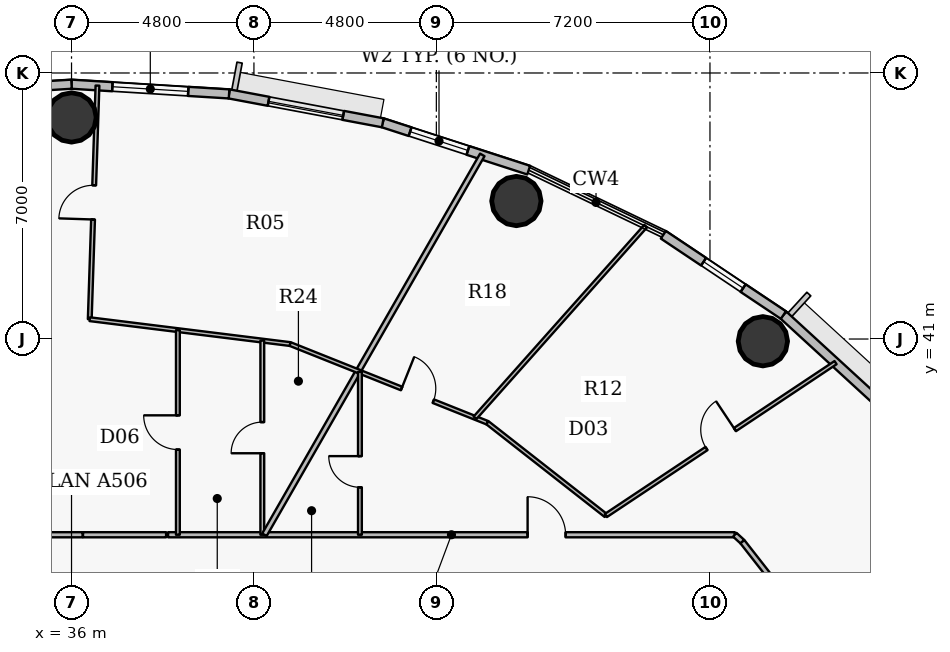
"""IFC4 building model, lengths in metres.
Left out: names, types, materials, properties, quantities, classifications, styles, units other than length and angle.
Written with IfcOpenShell. Run it as: python <this file> out.ifc"""

import sys

from ifc_helpers import new_model, si_unit, direction, frame, frame_2d, origin, origin_2d, place, context, subcontext, project, spatial, rectangle, hollow_circle, extrude, source, transform, mapped, element, fill, save


model = new_model("IFC4")
c1 = context("Model", 3, precision=1e-05, world=origin(), true_north=direction((0.0, 1.0)))
c2 = subcontext(c1, "Body", "Model", "MODEL_VIEW")
j1 = project(units=[si_unit("LENGTHUNIT", "METRE"), si_unit("PLANEANGLEUNIT", "RADIAN")], contexts=[c1])
p1 = place(None, origin())
s1 = spatial("IfcSite", under=j1, at=p1, CompositionType="ELEMENT")
p2 = place(p1, origin())
s2 = spatial("IfcBuilding", under=s1, at=p2, CompositionType="ELEMENT")
p3 = place(p2, frame((0.0, 0.0, 197.4)))
s3 = spatial("IfcBuildingStorey", under=s2, at=p3, CompositionType="ELEMENT", Elevation=197.4)
for number, where, z_axis, x_axis in (
    (1, (54.192, 40.942, 0.0), (0.0, 0.0, 1.0), (1.0, 0.0, 0.0)),
    (2, (47.706, 44.631, 0.0), (0.0, 0.0, 1.0), (1.0, 0.0, 0.0)),
    (3, (36.0, 46.83, 0.0), (0.0, 0.0, 1.0), (1.0, 0.0, 0.0)),
):
    element("IfcColumn", number, at=place(p3, frame(where, z_axis=z_axis, x_axis=x_axis)), inside=s3, PredefinedType="COLUMN", context=c2, shape_type="SweptSolid", body=[
        extrude(hollow_circle(Radius=0.65, WallThickness=0.04, at=origin_2d()), origin(), (0.0, 0.0, 1.0), 3.75),
    ])
p4 = place(p3, frame((54.732, 41.631, 0.0), z_axis=(0.0, 0.0, 1.0), x_axis=(0.737076565834, -0.675809245349, 0.0)))
e4 = element("IfcWall", 4, at=p4, inside=s3, PredefinedType="SOLIDWALL", context=c2, shape_type="SweptSolid", body=[
    extrude(rectangle(XDim=3.658, YDim=0.24, at=frame_2d((1.829, 0.0))), origin(), (0.0, 0.0, 1.0), 3.5),
])
p5 = place(p3, frame((51.573, 43.743, 0.0), z_axis=(0.0, 0.0, 1.0), x_axis=(0.831228998277, -0.555930168657, 0.0)))
e5 = element("IfcWall", 5, at=p5, inside=s3, PredefinedType="SOLIDWALL", context=c2, shape_type="SweptSolid", body=[
    extrude(rectangle(XDim=3.8, YDim=0.24, at=frame_2d((1.9, 0.0))), origin(), (0.0, 0.0, 1.0), 3.5),
])
p6 = place(p5, frame((1.275, 0.0, 0.9)))
e6 = element("IfcOpeningElement", 6, at=p6, cuts=e5, PredefinedType="OPENING", context=c2, shape_type="SweptSolid", body=[
    extrude(rectangle(XDim=1.25, YDim=1.65, at=origin_2d()), frame((0.625, 0.13, 0.825), z_axis=(0.0, -1.0, 0.0), x_axis=(1.0, 0.0, 0.0)), (0.0, 0.0, 1.0), 0.26),
])
p7 = place(p3, frame((44.189, 46.689, 0.0), z_axis=(0.0, 0.0, 1.0), x_axis=(0.951209870236, -0.30854462038, 0.0)))
e7 = element("IfcWall", 7, at=p7, inside=s3, PredefinedType="SOLIDWALL", context=c2, shape_type="SweptSolid", body=[
    extrude(rectangle(XDim=4.038, YDim=0.24, at=frame_2d((2.019, 0.0))), origin(), (0.0, 0.0, 1.0), 3.5),
])
p8 = place(p7, frame((0.757, 0.0, 0.9)))
e8 = element("IfcOpeningElement", 8, at=p8, cuts=e7, PredefinedType="OPENING", context=c2, shape_type="SweptSolid", body=[
    extrude(rectangle(XDim=1.6, YDim=1.75, at=origin_2d()), frame((0.8, 0.13, 0.875), z_axis=(0.0, -1.0, 0.0), x_axis=(1.0, 0.0, 0.0)), (0.0, 0.0, 1.0), 0.26),
])
p9 = place(p3, frame((40.146, 47.449, 0.0), z_axis=(0.0, 0.0, 1.0), x_axis=(0.982788108205, -0.184736391573, 0.0)))
e9 = element("IfcWall", 9, at=p9, inside=s3, PredefinedType="SOLIDWALL", context=c2, shape_type="SweptSolid", body=[
    extrude(rectangle(XDim=4.114, YDim=0.24, at=frame_2d((2.057, 0.0))), origin(), (0.0, 0.0, 1.0), 3.5),
])
p10 = place(p9, frame((1.057, 0.0, 0.9)))
e10 = element("IfcOpeningElement", 10, at=p10, cuts=e9, PredefinedType="OPENING", context=c2, shape_type="SweptSolid", body=[
    extrude(rectangle(XDim=2.0, YDim=1.75, at=origin_2d()), frame((1.0, 0.13, 0.875), z_axis=(0.0, -1.0, 0.0), x_axis=(1.0, 0.0, 0.0)), (0.0, 0.0, 1.0), 0.26),
])
p11 = place(p3, frame((36.0, 47.705, 0.0), z_axis=(0.0, 0.0, 1.0), x_axis=(0.998104600619, -0.061540281305, 0.0)))
e11 = element("IfcWall", 11, at=p11, inside=s3, PredefinedType="SOLIDWALL", context=c2, shape_type="SweptSolid", body=[
    extrude(rectangle(XDim=4.154, YDim=0.24, at=frame_2d((2.077, 0.0))), origin(), (0.0, 0.0, 1.0), 3.5),
])
p12 = place(p11, frame((1.077, 0.0, 0.9)))
e12 = element("IfcOpeningElement", 12, at=p12, cuts=e11, PredefinedType="OPENING", context=c2, shape_type="SweptSolid", body=[
    extrude(rectangle(XDim=2.0, YDim=1.75, at=origin_2d()), frame((1.0, 0.13, 0.875), z_axis=(0.0, -1.0, 0.0), x_axis=(1.0, 0.0, 0.0)), (0.0, 0.0, 1.0), 0.26),
])
p13 = place(p3, frame((31.854, 47.449, 0.0), z_axis=(0.0, 0.0, 1.0), x_axis=(0.998104600619, 0.061540281305, 0.0)))
e13 = element("IfcWall", 13, at=p13, inside=s3, PredefinedType="SOLIDWALL", context=c2, shape_type="SweptSolid", body=[
    extrude(rectangle(XDim=4.154, YDim=0.24, at=frame_2d((2.077, 0.0))), origin(), (0.0, 0.0, 1.0), 3.5),
])
p14 = place(p13, frame((1.077, 0.0, 0.9)))
e14 = element("IfcOpeningElement", 14, at=p14, cuts=e13, PredefinedType="OPENING", context=c2, shape_type="SweptSolid", body=[
    extrude(rectangle(XDim=2.0, YDim=1.75, at=origin_2d()), frame((1.0, 0.13, 0.875), z_axis=(0.0, -1.0, 0.0), x_axis=(1.0, 0.0, 0.0)), (0.0, 0.0, 1.0), 0.26),
])
p15 = place(p3, frame((24.35, 35.85, 0.0), z_axis=(0.0, 0.0, 1.0), x_axis=(1.0, 0.0, 0.0)))
e15 = element("IfcWall", 15, at=p15, inside=s3, PredefinedType="PARTITIONING", context=c2, shape_type="SweptSolid", body=[
    extrude(rectangle(XDim=11.942, YDim=0.135, at=frame_2d((5.971, 0.0))), origin(), (0.0, 0.0, 1.0), 2.935),
])
p16 = place(p15, frame((5.471, 0.0, 0.0)))
e16 = element("IfcOpeningElement", 16, at=p16, cuts=e15, PredefinedType="OPENING", context=c2, shape_type="SweptSolid", body=[
    extrude(rectangle(XDim=1.0, YDim=2.15, at=origin_2d()), frame((0.5, 0.078, 1.075), z_axis=(0.0, -1.0, 0.0), x_axis=(1.0, 0.0, 0.0)), (0.0, 0.0, 1.0), 0.155),
])
p17 = place(p3, frame((36.48, 41.521, 0.0), z_axis=(0.0, 0.0, 1.0), x_axis=(0.033029315495, 0.99945438331, 0.0)))
e17 = element("IfcWall", 17, at=p17, inside=s3, PredefinedType="PARTITIONING", context=c2, shape_type="SweptSolid", body=[
    extrude(rectangle(XDim=6.15, YDim=0.1, at=frame_2d((3.075, 0.0))), origin(), (0.0, 0.0, 1.0), 2.935),
])
p18 = place(p17, frame((2.625, 0.0, 0.0)))
e18 = element("IfcOpeningElement", 18, at=p18, cuts=e17, PredefinedType="OPENING", context=c2, shape_type="SweptSolid", body=[
    extrude(rectangle(XDim=0.9, YDim=2.1, at=origin_2d()), frame((0.45, 0.06, 1.05), z_axis=(0.0, -1.0, 0.0), x_axis=(1.0, 0.0, 0.0)), (0.0, 0.0, 1.0), 0.12),
])
p19 = place(p3, frame((36.48, 41.521, 0.0), z_axis=(0.0, 0.0, 1.0), x_axis=(0.992397562131, -0.123073468612, 0.0)))
e19 = element("IfcWall", 19, at=p19, inside=s3, PredefinedType="PARTITIONING", context=c2, shape_type="SweptSolid", body=[
    extrude(rectangle(XDim=5.314, YDim=0.1, at=frame_2d((2.657, 0.0))), origin(), (0.0, 0.0, 1.0), 3.5),
])
p20 = place(p3, frame((38.541, 35.85, 0.0), z_axis=(0.0, 0.0, 1.0), x_axis=(1.0, 0.0, 0.0)))
e20 = element("IfcWall", 20, at=p20, inside=s3, PredefinedType="PARTITIONING", context=c2, shape_type="SweptSolid", body=[
    extrude(rectangle(XDim=14.913, YDim=0.135, at=frame_2d((7.456, 0.0))), origin(), (0.0, 0.0, 1.0), 2.935),
])
p21 = place(p20, frame((9.46, 0.0, 0.0)))
e21 = element("IfcOpeningElement", 21, at=p21, cuts=e20, PredefinedType="OPENING", context=c2, shape_type="SweptSolid", body=[
    extrude(rectangle(XDim=1.0, YDim=2.15, at=origin_2d()), frame((0.5, 0.078, 1.075), z_axis=(0.0, -1.0, 0.0), x_axis=(1.0, 0.0, 0.0)), (0.0, 0.0, 1.0), 0.155),
])
p22 = place(p3, frame((38.799, 35.85, 0.0), z_axis=(0.0, 0.0, 1.0), x_axis=(0.0, 1.0, 0.0)))
e22 = element("IfcWall", 22, at=p22, inside=s3, PredefinedType="PARTITIONING", context=c2, shape_type="SweptSolid", body=[
    extrude(rectangle(XDim=5.384, YDim=0.1, at=frame_2d((2.692, 0.0))), origin(), (0.0, 0.0, 1.0), 3.5),
])
p23 = place(p22, frame((2.242, 0.0, 0.0)))
e23 = element("IfcOpeningElement", 23, at=p23, cuts=e22, PredefinedType="OPENING", context=c2, shape_type="SweptSolid", body=[
    extrude(rectangle(XDim=0.9, YDim=2.1, at=origin_2d()), frame((0.45, 0.06, 1.05), z_axis=(0.0, -1.0, 0.0), x_axis=(1.0, 0.0, 0.0)), (0.0, 0.0, 1.0), 0.12),
])
p24 = place(p3, frame((41.02, 35.85, 0.0), z_axis=(0.0, 0.0, 1.0), x_axis=(0.0, 1.0, 0.0)))
e24 = element("IfcWall", 24, at=p24, inside=s3, PredefinedType="PARTITIONING", context=c2, shape_type="SweptSolid", body=[
    extrude(rectangle(XDim=5.108, YDim=0.1, at=frame_2d((2.554, 0.0))), origin(), (0.0, 0.0, 1.0), 3.5),
])
p25 = place(p24, frame((2.144, 0.0, 0.0)))
e25 = element("IfcOpeningElement", 25, at=p25, cuts=e24, PredefinedType="OPENING", context=c2, shape_type="SweptSolid", body=[
    extrude(rectangle(XDim=0.82, YDim=2.1, at=origin_2d()), frame((0.41, 0.06, 1.05), z_axis=(0.0, -1.0, 0.0), x_axis=(1.0, 0.0, 0.0)), (0.0, 0.0, 1.0), 0.12),
])
p26 = place(p3, frame((41.076, 35.85, 0.0), z_axis=(0.0, 0.0, 1.0), x_axis=(0.497557605347, 0.867430936364, 0.0)))
e26 = element("IfcWall", 26, at=p26, inside=s3, PredefinedType="PARTITIONING", context=c2, shape_type="SweptSolid", body=[
    extrude(rectangle(XDim=11.522, YDim=0.135, at=frame_2d((5.761, 0.0))), origin(), (0.0, 0.0, 1.0), 2.935),
])
p27 = place(p3, frame((41.754, 40.867, 0.0), z_axis=(0.0, 0.0, 1.0), x_axis=(0.928792710591, -0.370599650233, 0.0)))
e27 = element("IfcWall", 27, at=p27, inside=s3, PredefinedType="PARTITIONING", context=c2, shape_type="SweptSolid", body=[
    extrude(rectangle(XDim=5.588, YDim=0.1, at=frame_2d((2.794, 0.0))), origin(), (0.0, 0.0, 1.0), 2.935),
])
p28 = place(p27, frame((3.156, 0.0, 0.0)))
e28 = element("IfcOpeningElement", 28, at=p28, cuts=e27, PredefinedType="OPENING", context=c2, shape_type="SweptSolid", body=[
    extrude(rectangle(XDim=0.9, YDim=2.1, at=origin_2d()), frame((0.45, 0.06, 1.05), z_axis=(0.0, -1.0, 0.0), x_axis=(1.0, 0.0, 0.0)), (0.0, 0.0, 1.0), 0.12),
])
p29 = place(p3, frame((43.589, 35.85, 0.0), z_axis=(0.0, 0.0, 1.0), x_axis=(0.0, 1.0, 0.0)))
e29 = element("IfcWall", 29, at=p29, inside=s3, PredefinedType="PARTITIONING", context=c2, shape_type="SweptSolid", body=[
    extrude(rectangle(XDim=4.285, YDim=0.1, at=frame_2d((2.143, 0.0))), origin(), (0.0, 0.0, 1.0), 2.935),
])
p30 = place(p29, frame((1.249, 0.0, 0.0)))
e30 = element("IfcOpeningElement", 30, at=p30, cuts=e29, PredefinedType="OPENING", context=c2, shape_type="SweptSolid", body=[
    extrude(rectangle(XDim=0.82, YDim=2.1, at=origin_2d()), frame((0.41, 0.06, 1.05), z_axis=(0.0, -1.0, 0.0), x_axis=(1.0, 0.0, 0.0)), (0.0, 0.0, 1.0), 0.12),
])
p31 = place(p3, frame((46.617, 38.927, 0.0), z_axis=(0.0, 0.0, 1.0), x_axis=(0.664908846083, 0.746924511849, 0.0)))
e31 = element("IfcWall", 31, at=p31, inside=s3, PredefinedType="PARTITIONING", context=c2, shape_type="SweptSolid", body=[
    extrude(rectangle(XDim=6.754, YDim=0.1, at=frame_2d((3.377, 0.0))), origin(), (0.0, 0.0, 1.0), 2.935),
])
p32 = place(p3, frame((46.945, 38.796, 0.0), z_axis=(0.0, 0.0, 1.0), x_axis=(0.787314896848, -0.616551095369, 0.0)))
e32 = element("IfcWall", 32, at=p32, inside=s3, PredefinedType="PARTITIONING", context=c2, shape_type="SweptSolid", body=[
    extrude(rectangle(XDim=3.958, YDim=0.1, at=frame_2d((1.979, 0.0))), origin(), (0.0, 0.0, 1.0), 2.935),
])
p33 = place(p3, frame((50.06, 36.356, 0.0), z_axis=(0.0, 0.0, 1.0), x_axis=(0.832520763353, 0.553993843455, 0.0)))
e33 = element("IfcWall", 33, at=p33, inside=s3, PredefinedType="PARTITIONING", context=c2, shape_type="SweptSolid", body=[
    extrude(rectangle(XDim=7.26, YDim=0.1, at=frame_2d((3.63, 0.0))), origin(), (0.0, 0.0, 1.0), 2.935),
])
p34 = place(p33, frame((3.18, 0.0, 0.0)))
e34 = element("IfcOpeningElement", 34, at=p34, cuts=e33, PredefinedType="OPENING", context=c2, shape_type="SweptSolid", body=[
    extrude(rectangle(XDim=0.9, YDim=2.1, at=origin_2d()), frame((0.45, 0.06, 1.05), z_axis=(0.0, -1.0, 0.0), x_axis=(1.0, 0.0, 0.0)), (0.0, 0.0, 1.0), 0.12),
])
p35 = place(p3, frame((53.454, 35.85, 0.0), z_axis=(0.0, 0.0, 1.0), x_axis=(0.736667385572, -0.676255249913, 0.0)))
e35 = element("IfcWall", 35, at=p35, inside=s3, PredefinedType="PARTITIONING", context=c2, shape_type="SweptSolid", body=[
    extrude(rectangle(XDim=0.271, YDim=0.135, at=frame_2d((0.135, 0.0))), origin(), (0.0, 0.0, 1.0), 3.5),
])
p36 = place(p3, frame((53.653, 35.667, 0.0), z_axis=(0.0, 0.0, 1.0), x_axis=(0.616302223209, -0.787509726713, 0.0)))
e36 = element("IfcWall", 36, at=p36, inside=s3, PredefinedType="PARTITIONING", context=c2, shape_type="SweptSolid", body=[
    extrude(rectangle(XDim=2.18, YDim=0.135, at=frame_2d((1.09, 0.0))), origin(), (0.0, 0.0, 1.0), 3.5),
])
p37 = place(p3, frame((36.302, 35.85, 0.0), z_axis=(0.0, 0.0, 1.0), x_axis=(1.0, 0.0, 0.0)))
e37 = element("IfcWall", 37, at=p37, inside=s3, PredefinedType="PARTITIONING", context=c2, shape_type="SweptSolid", body=[
    extrude(rectangle(XDim=2.187, YDim=0.135, at=frame_2d((1.093, 0.0))), origin(), (0.0, 0.0, 1.0), 3.5),
])
m1 = source(origin(), c2, "Body", "SweptSolid", [
    extrude(rectangle(XDim=1.6, YDim=1.75, at=origin_2d()), frame((0.8, 0.03, 0.875), z_axis=(0.0, -1.0, 0.0), x_axis=(1.0, 0.0, 0.0)), (0.0, 0.0, 1.0), 0.06),
])
p38 = place(p8, origin())
e38 = element("IfcWindow", 38, at=p38, inside=s3, PartitioningType="DOUBLE_PANEL_VERTICAL", PredefinedType="WINDOW", context=c2, shape_type="MappedRepresentation", body=[
    mapped(m1, transform((0.0, 0.0, 0.0), x_axis=(1.0, 0.0, 0.0), y_axis=(0.0, 1.0, 0.0), z_axis=(0.0, 0.0, 1.0), scale=1.0)),
])
fill(e8, e38)
m2 = source(origin(), c2, "Body", "SweptSolid", [
    extrude(rectangle(XDim=2.0, YDim=1.75, at=origin_2d()), frame((1.0, 0.03, 0.875), z_axis=(0.0, -1.0, 0.0), x_axis=(1.0, 0.0, 0.0)), (0.0, 0.0, 1.0), 0.06),
])
p39 = place(p10, origin())
e39 = element("IfcWindow", 39, at=p39, inside=s3, PartitioningType="DOUBLE_PANEL_VERTICAL", PredefinedType="WINDOW", context=c2, shape_type="MappedRepresentation", body=[
    mapped(m2, transform((0.0, 0.0, 0.0), x_axis=(1.0, 0.0, 0.0), y_axis=(0.0, 1.0, 0.0), z_axis=(0.0, 0.0, 1.0), scale=1.0)),
])
fill(e10, e39)
p40 = place(p12, origin())
e40 = element("IfcWindow", 40, at=p40, inside=s3, PartitioningType="DOUBLE_PANEL_VERTICAL", PredefinedType="WINDOW", context=c2, shape_type="MappedRepresentation", body=[
    mapped(m2, transform((0.0, 0.0, 0.0), x_axis=(1.0, 0.0, 0.0), y_axis=(0.0, 1.0, 0.0), z_axis=(0.0, 0.0, 1.0), scale=1.0)),
])
fill(e12, e40)
m3 = source(origin(), c2, "Body", "SweptSolid", [
    extrude(rectangle(XDim=1.25, YDim=1.65, at=origin_2d()), frame((0.625, 0.03, 0.825), z_axis=(0.0, -1.0, 0.0), x_axis=(1.0, 0.0, 0.0)), (0.0, 0.0, 1.0), 0.06),
])
p41 = place(p6, origin())
e41 = element("IfcWindow", 41, at=p41, inside=s3, PartitioningType="SINGLE_PANEL", PredefinedType="WINDOW", context=c2, shape_type="MappedRepresentation", body=[
    mapped(m3, transform((0.0, 0.0, 0.0), x_axis=(1.0, 0.0, 0.0), y_axis=(0.0, 1.0, 0.0), z_axis=(0.0, 0.0, 1.0), scale=1.0)),
])
fill(e6, e41)
m4 = source(origin(), c2, "Body", "SweptSolid", [
    extrude(rectangle(XDim=1.0, YDim=2.15, at=origin_2d()), frame((0.5, 0.025, 1.075), z_axis=(0.0, -1.0, 0.0), x_axis=(1.0, 0.0, 0.0)), (0.0, 0.0, 1.0), 0.05),
])
p42 = place(p21, origin())
e42 = element("IfcDoor", 42, at=p42, inside=s3, OperationType="SINGLE_SWING_LEFT", PredefinedType="DOOR", context=c2, shape_type="MappedRepresentation", body=[
    mapped(m4, transform((0.0, 0.0, 0.0), x_axis=(1.0, 0.0, 0.0), y_axis=(0.0, 1.0, 0.0), z_axis=(0.0, 0.0, 1.0), scale=1.0)),
])
fill(e21, e42)
m5 = source(origin(), c2, "Body", "SweptSolid", [
    extrude(rectangle(XDim=0.9, YDim=2.1, at=origin_2d()), frame((0.45, 0.025, 1.05), z_axis=(0.0, -1.0, 0.0), x_axis=(1.0, 0.0, 0.0)), (0.0, 0.0, 1.0), 0.05),
])
p43 = place(p34, origin())
e43 = element("IfcDoor", 43, at=p43, inside=s3, OperationType="SINGLE_SWING_RIGHT", PredefinedType="DOOR", context=c2, shape_type="MappedRepresentation", body=[
    mapped(m5, transform((0.0, 0.0, 0.0), x_axis=(1.0, 0.0, 0.0), y_axis=(0.0, 1.0, 0.0), z_axis=(0.0, 0.0, 1.0), scale=1.0)),
])
fill(e34, e43)
p44 = place(p28, origin())
e44 = element("IfcDoor", 44, at=p44, inside=s3, OperationType="SINGLE_SWING_LEFT", PredefinedType="DOOR", context=c2, shape_type="MappedRepresentation", body=[
    mapped(m5, transform((0.0, 0.0, 0.0), x_axis=(1.0, 0.0, 0.0), y_axis=(0.0, 1.0, 0.0), z_axis=(0.0, 0.0, 1.0), scale=1.0)),
])
fill(e28, e44)
m6 = source(origin(), c2, "Body", "SweptSolid", [
    extrude(rectangle(XDim=0.82, YDim=2.1, at=origin_2d()), frame((0.41, 0.025, 1.05), z_axis=(0.0, -1.0, 0.0), x_axis=(1.0, 0.0, 0.0)), (0.0, 0.0, 1.0), 0.05),
])
p45 = place(p30, origin())
e45 = element("IfcDoor", 45, at=p45, inside=s3, OperationType="SINGLE_SWING_RIGHT", PredefinedType="DOOR", context=c2, shape_type="MappedRepresentation", body=[
    mapped(m6, transform((0.0, 0.0, 0.0), x_axis=(1.0, 0.0, 0.0), y_axis=(0.0, 1.0, 0.0), z_axis=(0.0, 0.0, 1.0), scale=1.0)),
])
fill(e30, e45)
p46 = place(p18, origin())
e46 = element("IfcDoor", 46, at=p46, inside=s3, OperationType="SINGLE_SWING_LEFT", PredefinedType="DOOR", context=c2, shape_type="MappedRepresentation", body=[
    mapped(m5, transform((0.0, 0.0, 0.0), x_axis=(1.0, 0.0, 0.0), y_axis=(0.0, 1.0, 0.0), z_axis=(0.0, 0.0, 1.0), scale=1.0)),
])
fill(e18, e46)
p47 = place(p23, origin())
e47 = element("IfcDoor", 47, at=p47, inside=s3, OperationType="SINGLE_SWING_RIGHT", PredefinedType="DOOR", context=c2, shape_type="MappedRepresentation", body=[
    mapped(m5, transform((0.0, 0.0, 0.0), x_axis=(1.0, 0.0, 0.0), y_axis=(0.0, 1.0, 0.0), z_axis=(0.0, 0.0, 1.0), scale=1.0)),
])
fill(e23, e47)
p48 = place(p25, origin())
e48 = element("IfcDoor", 48, at=p48, inside=s3, OperationType="SINGLE_SWING_LEFT", PredefinedType="DOOR", context=c2, shape_type="MappedRepresentation", body=[
    mapped(m6, transform((0.0, 0.0, 0.0), x_axis=(1.0, 0.0, 0.0), y_axis=(0.0, 1.0, 0.0), z_axis=(0.0, 0.0, 1.0), scale=1.0)),
])
fill(e25, e48)
save(model, sys.argv[1])
